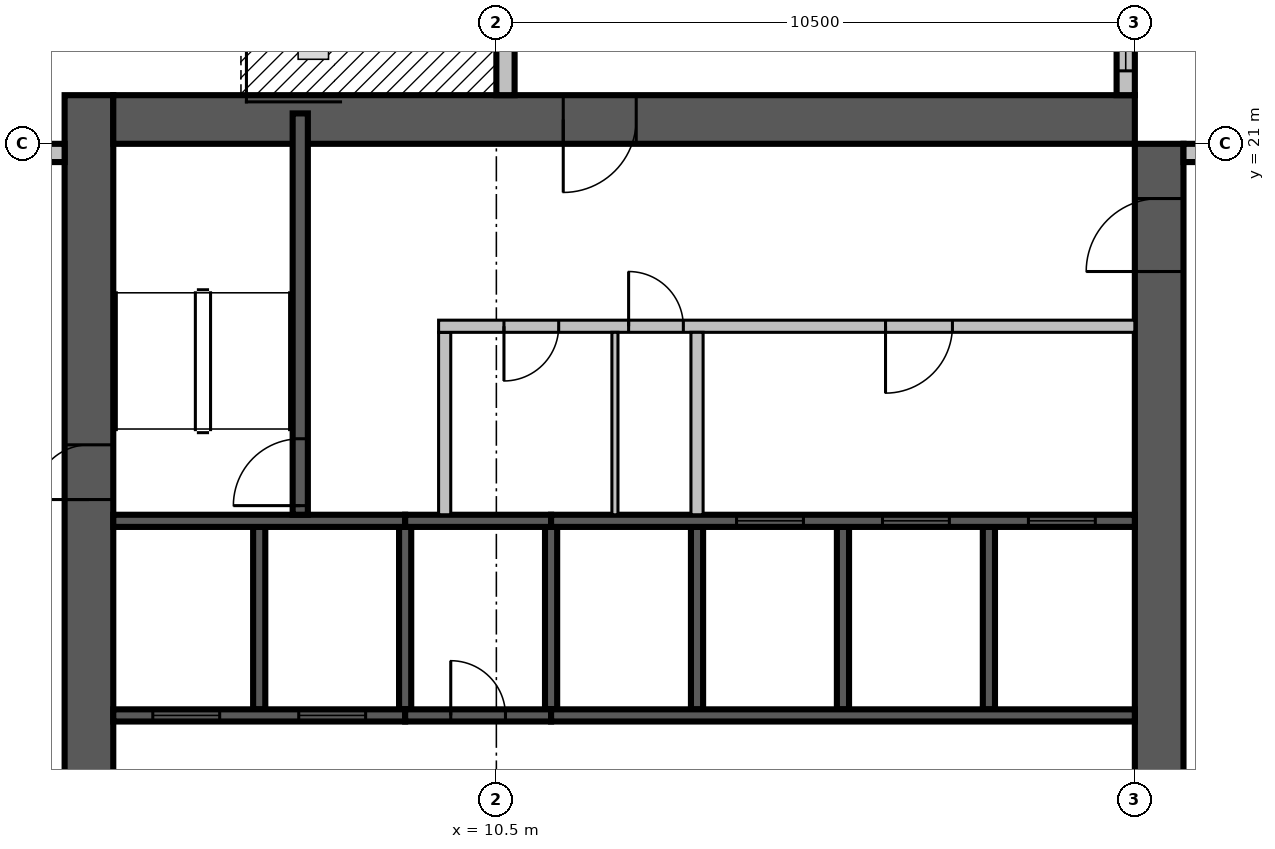
"""IFC4 building model, lengths in metres.
Left out: names, types, materials, properties, quantities, classifications, styles, units other than length and angle.
Written with IfcOpenShell. Run it as: python <this file> out.ifc"""

import sys

from ifc_helpers import new_model, si_unit, direction, frame, frame_2d, origin, place, context, subcontext, project, spatial, rectangle, extrude, source, transform, mapped, element, fill, save


model = new_model("IFC4")
c1 = context("Model", 3, precision=1e-05, world=origin(), true_north=direction((0.0, 1.0)))
c2 = subcontext(c1, "Body", "Model", "MODEL_VIEW")
j1 = project(units=[si_unit("LENGTHUNIT", "METRE"), si_unit("PLANEANGLEUNIT", "RADIAN")], contexts=[c1])
p1 = place(None, origin())
s1 = spatial("IfcSite", under=j1, at=p1, CompositionType="ELEMENT")
p2 = place(p1, origin())
s2 = spatial("IfcBuilding", under=s1, at=p2, CompositionType="ELEMENT")
p3 = place(p2, frame((0.0, 0.0, 231.0)))
s3 = spatial("IfcBuildingStorey", under=s2, at=p3, CompositionType="ELEMENT", Elevation=231.0)
m1 = source(origin(), c2, "Body", "SweptSolid", [
    extrude(rectangle(XDim=17.6, YDim=0.8, at=frame_2d((8.8, 0.0))), origin(), (0.0, 0.0, 1.0), 3.8),
])
p4 = place(p3, frame((3.8, 4.2, 0.0), z_axis=(0.0, 0.0, 1.0), x_axis=(0.0, 1.0, 0.0)))
e1 = element("IfcWall", 1, at=p4, inside=s3, PredefinedType="SHEAR", context=c2, shape_type="MappedRepresentation", body=[
    mapped(m1, transform((0.0, 0.0, 0.0), scale=1.0)),
])
m2 = source(origin(), c2, "Body", "SweptSolid", [
    extrude(rectangle(XDim=2.2, YDim=2.1, at=frame_2d((1.1, 1.05))), frame((0.0, 0.41, 0.0), z_axis=(0.0, -1.0, 0.0), x_axis=(1.0, 0.0, 0.0)), (0.0, 0.0, 1.0), 0.82),
])
p5 = place(p4, frame((4.2, 0.0, 0.0)))
e2 = element("IfcOpeningElement", 2, at=p5, cuts=e1, PredefinedType="OPENING", context=c2, shape_type="MappedRepresentation", body=[
    mapped(m2, transform((0.0, 0.0, 0.0), scale=1.0)),
])
m3 = source(origin(), c2, "Body", "SweptSolid", [
    extrude(rectangle(XDim=0.9, YDim=2.1, at=frame_2d((0.45, 1.05))), frame((0.0, 0.41, 0.0), z_axis=(0.0, -1.0, 0.0), x_axis=(1.0, 0.0, 0.0)), (0.0, 0.0, 1.0), 0.82),
])
p6 = place(p4, frame((10.95, 0.0, 0.0)))
e3 = element("IfcOpeningElement", 3, at=p6, cuts=e1, PredefinedType="OPENING", context=c2, shape_type="MappedRepresentation", body=[
    mapped(m3, transform((0.0, 0.0, 0.0), scale=1.0)),
])
m4 = source(origin(), c2, "Body", "SweptSolid", [
    extrude(rectangle(XDim=16.8, YDim=0.8, at=frame_2d((8.4, 0.0))), origin(), (0.0, 0.0, 1.0), 3.8),
])
p7 = place(p3, frame((21.4, 4.2, 0.0), z_axis=(0.0, 0.0, 1.0), x_axis=(0.0, 1.0, 0.0)))
e4 = element("IfcWall", 4, at=p7, inside=s3, PredefinedType="SHEAR", context=c2, shape_type="MappedRepresentation", body=[
    mapped(m4, transform((0.0, 0.0, 0.0), scale=1.0)),
])
p8 = place(p7, frame((4.2, 0.0, 0.0)))
e5 = element("IfcOpeningElement", 5, at=p8, cuts=e4, PredefinedType="OPENING", context=c2, shape_type="MappedRepresentation", body=[
    mapped(m2, transform((0.0, 0.0, 0.0), scale=1.0)),
])
m5 = source(origin(), c2, "Body", "SweptSolid", [
    extrude(rectangle(XDim=1.2, YDim=2.1, at=frame_2d((0.6, 1.05))), frame((0.0, 0.41, 0.0), z_axis=(0.0, -1.0, 0.0), x_axis=(1.0, 0.0, 0.0)), (0.0, 0.0, 1.0), 0.82),
])
p9 = place(p7, frame((14.7, 0.0, 0.0)))
e6 = element("IfcOpeningElement", 6, at=p9, cuts=e4, PredefinedType="OPENING", context=c2, shape_type="MappedRepresentation", body=[
    mapped(m5, transform((0.0, 0.0, 0.0), scale=1.0)),
])
p10 = place(p3, frame((4.2, 21.4, 0.0), z_axis=(0.0, 0.0, 1.0), x_axis=(1.0, 0.0, 0.0)))
e7 = element("IfcWall", 7, at=p10, inside=s3, PredefinedType="SHEAR", context=c2, shape_type="MappedRepresentation", body=[
    mapped(m4, transform((0.0, 0.0, 0.0), scale=1.0)),
])
p11 = place(p10, frame((7.4, 0.0, 0.0)))
e8 = element("IfcOpeningElement", 8, at=p11, cuts=e7, PredefinedType="OPENING", context=c2, shape_type="MappedRepresentation", body=[
    mapped(m5, transform((0.0, 0.0, 0.0), scale=1.0)),
])
m6 = source(origin(), c2, "Body", "SweptSolid", [
    extrude(rectangle(XDim=7.2, YDim=0.3, at=frame_2d((3.6, 0.0))), origin(), (0.0, 0.0, 1.0), 3.4),
])
p12 = place(p3, frame((29.0, 20.85, 0.0), z_axis=(0.0, 0.0, 1.0), x_axis=(-1.0, 0.0, 0.0)))
e9 = element("IfcWall", 9, at=p12, inside=s3, PredefinedType="STANDARD", context=c2, shape_type="MappedRepresentation", body=[
    mapped(m6, transform((0.0, 0.0, 0.0), scale=1.0)),
])
m7 = source(origin(), c2, "Body", "SweptSolid", [
    extrude(rectangle(XDim=3.0, YDim=2.3, at=frame_2d((1.5, 1.15))), frame((0.0, 0.16, 0.0), z_axis=(0.0, -1.0, 0.0), x_axis=(1.0, 0.0, 0.0)), (0.0, 0.0, 1.0), 0.32),
])
p13 = place(p12, frame((0.2, 0.0, 0.6)))
e10 = element("IfcOpeningElement", 10, at=p13, cuts=e9, PredefinedType="OPENING", context=c2, shape_type="MappedRepresentation", body=[
    mapped(m7, transform((0.0, 0.0, 0.0), scale=1.0)),
])
m8 = source(origin(), c2, "Body", "SweptSolid", [
    extrude(rectangle(XDim=1.8, YDim=2.3, at=frame_2d((0.9, 1.15))), frame((0.0, 0.16, 0.0), z_axis=(0.0, -1.0, 0.0), x_axis=(1.0, 0.0, 0.0)), (0.0, 0.0, 1.0), 0.32),
])
p14 = place(p12, frame((5.0, 0.0, 0.6)))
e11 = element("IfcOpeningElement", 11, at=p14, cuts=e9, PredefinedType="OPENING", context=c2, shape_type="MappedRepresentation", body=[
    mapped(m8, transform((0.0, 0.0, 0.0), scale=1.0)),
])
p15 = place(p3, frame((20.85, 21.8, 0.0), z_axis=(0.0, 0.0, 1.0), x_axis=(0.0, 1.0, 0.0)))
e12 = element("IfcWall", 12, at=p15, inside=s3, PredefinedType="STANDARD", context=c2, shape_type="MappedRepresentation", body=[
    mapped(m6, transform((0.0, 0.0, 0.0), scale=1.0)),
])
p16 = place(p15, frame((0.4, 0.0, 0.6)))
e13 = element("IfcOpeningElement", 13, at=p16, cuts=e12, PredefinedType="OPENING", context=c2, shape_type="MappedRepresentation", body=[
    mapped(m8, transform((0.0, 0.0, 0.0), scale=1.0)),
])
p17 = place(p15, frame((4.0, 0.0, 0.6)))
e14 = element("IfcOpeningElement", 14, at=p17, cuts=e12, PredefinedType="OPENING", context=c2, shape_type="MappedRepresentation", body=[
    mapped(m7, transform((0.0, 0.0, 0.0), scale=1.0)),
])
p18 = place(p3, frame((10.65, 29.0, 0.0), z_axis=(0.0, 0.0, 1.0), x_axis=(0.0, -1.0, 0.0)))
e15 = element("IfcWall", 15, at=p18, inside=s3, PredefinedType="STANDARD", context=c2, shape_type="MappedRepresentation", body=[
    mapped(m6, transform((0.0, 0.0, 0.0), scale=1.0)),
])
m9 = source(origin(), c2, "Body", "SweptSolid", [
    extrude(rectangle(XDim=1.8, YDim=2.4, at=frame_2d((0.9, 1.2))), frame((0.0, 0.16, 0.0), z_axis=(0.0, -1.0, 0.0), x_axis=(1.0, 0.0, 0.0)), (0.0, 0.0, 1.0), 0.32),
])
p19 = place(p18, frame((0.2, 0.0, 0.0)))
e16 = element("IfcOpeningElement", 16, at=p19, cuts=e15, PredefinedType="OPENING", context=c2, shape_type="MappedRepresentation", body=[
    mapped(m9, transform((0.0, 0.0, 0.0), scale=1.0)),
])
p20 = place(p18, frame((4.4, 0.0, 0.0)))
e17 = element("IfcOpeningElement", 17, at=p20, cuts=e15, PredefinedType="OPENING", context=c2, shape_type="MappedRepresentation", body=[
    mapped(m9, transform((0.0, 0.0, 0.0), scale=1.0)),
])
m10 = source(origin(), c2, "Body", "SweptSolid", [
    extrude(rectangle(XDim=2.6, YDim=0.3, at=frame_2d((1.3, 0.0))), origin(), (0.0, 0.0, 1.0), 3.4),
])
p21 = place(p3, frame((3.4, 20.85, 0.0), z_axis=(0.0, 0.0, 1.0), x_axis=(-1.0, 0.0, 0.0)))
e18 = element("IfcWall", 18, at=p21, inside=s3, PredefinedType="STANDARD", context=c2, shape_type="MappedRepresentation", body=[
    mapped(m10, transform((0.0, 0.0, 0.0), scale=1.0)),
])
p22 = place(p21, frame((0.4, 0.0, 0.6)))
e19 = element("IfcOpeningElement", 19, at=p22, cuts=e18, PredefinedType="OPENING", context=c2, shape_type="MappedRepresentation", body=[
    mapped(m8, transform((0.0, 0.0, 0.0), scale=1.0)),
])
m11 = source(origin(), c2, "Body", "SweptSolid", [
    extrude(rectangle(XDim=3.0, YDim=0.2, at=frame_2d((1.5, 0.0))), origin(), (0.0, 0.0, 1.0), 3.8),
])
p23 = place(p3, frame((6.6, 11.7, 0.0), z_axis=(0.0, 0.0, 1.0), x_axis=(0.0, 1.0, 0.0)))
e20 = element("IfcWall", 20, at=p23, inside=s3, PredefinedType="SOLIDWALL", context=c2, shape_type="MappedRepresentation", body=[
    mapped(m11, transform((0.0, 0.0, 0.0), scale=1.0)),
])
m12 = source(origin(), c2, "Body", "SweptSolid", [
    extrude(rectangle(XDim=3.0, YDim=0.2, at=frame_2d((1.5, 0.0))), origin(), (0.0, 0.0, 1.0), 3.4),
])
for number, where, z_axis, x_axis in (
    (21, (9.0, 11.7, 0.0), (0.0, 0.0, 1.0), (0.0, 1.0, 0.0)),
    (22, (11.4, 11.7, 0.0), (0.0, 0.0, 1.0), (0.0, 1.0, 0.0)),
):
    element("IfcWall", number, at=place(p3, frame(where, z_axis=z_axis, x_axis=x_axis)), inside=s3, PredefinedType="SOLIDWALL", context=c2, shape_type="MappedRepresentation", body=[
        mapped(m12, transform((0.0, 0.0, 0.0), scale=1.0)),
    ])
for number, where, z_axis, x_axis in (
    (23, (13.8, 11.7, 0.0), (0.0, 0.0, 1.0), (0.0, 1.0, 0.0)),
    (24, (16.2, 11.7, 0.0), (0.0, 0.0, 1.0), (0.0, 1.0, 0.0)),
    (25, (18.6, 11.7, 0.0), (0.0, 0.0, 1.0), (0.0, 1.0, 0.0)),
):
    element("IfcWall", number, at=place(p3, frame(where, z_axis=z_axis, x_axis=x_axis)), inside=s3, PredefinedType="SOLIDWALL", context=c2, shape_type="MappedRepresentation", body=[
        mapped(m11, transform((0.0, 0.0, 0.0), scale=1.0)),
    ])
m13 = source(origin(), c2, "Body", "SweptSolid", [
    extrude(rectangle(XDim=4.8, YDim=0.2, at=frame_2d((2.4, 0.0))), origin(), (0.0, 0.0, 1.0), 3.8),
])
p24 = place(p3, frame((4.2, 11.6, 0.0), z_axis=(0.0, 0.0, 1.0), x_axis=(1.0, 0.0, 0.0)))
e26 = element("IfcWall", 26, at=p24, inside=s3, PredefinedType="SOLIDWALL", context=c2, shape_type="MappedRepresentation", body=[
    mapped(m13, transform((0.0, 0.0, 0.0), scale=1.0)),
])
m14 = source(origin(), c2, "Body", "SweptSolid", [
    extrude(rectangle(XDim=1.1, YDim=2.1, at=frame_2d((0.55, 1.05))), frame((0.0, 0.11, 0.0), z_axis=(0.0, -1.0, 0.0), x_axis=(1.0, 0.0, 0.0)), (0.0, 0.0, 1.0), 0.22),
])
p25 = place(p24, frame((0.65, 0.0, 0.0)))
e27 = element("IfcOpeningElement", 27, at=p25, cuts=e26, PredefinedType="OPENING", context=c2, shape_type="MappedRepresentation", body=[
    mapped(m14, transform((0.0, 0.0, 0.0), scale=1.0)),
])
p26 = place(p24, frame((3.05, 0.0, 0.0)))
e28 = element("IfcOpeningElement", 28, at=p26, cuts=e26, PredefinedType="OPENING", context=c2, shape_type="MappedRepresentation", body=[
    mapped(m14, transform((0.0, 0.0, 0.0), scale=1.0)),
])
m15 = source(origin(), c2, "Body", "SweptSolid", [
    extrude(rectangle(XDim=2.4, YDim=0.2, at=frame_2d((1.2, 0.0))), origin(), (0.0, 0.0, 1.0), 3.4),
])
p27 = place(p3, frame((9.0, 11.6, 0.0), z_axis=(0.0, 0.0, 1.0), x_axis=(1.0, 0.0, 0.0)))
e29 = element("IfcWall", 29, at=p27, inside=s3, PredefinedType="SOLIDWALL", context=c2, shape_type="MappedRepresentation", body=[
    mapped(m15, transform((0.0, 0.0, 0.0), scale=1.0)),
])
m16 = source(origin(), c2, "Body", "SweptSolid", [
    extrude(rectangle(XDim=0.9, YDim=2.1, at=frame_2d((0.45, 1.05))), frame((0.0, 0.11, 0.0), z_axis=(0.0, -1.0, 0.0), x_axis=(1.0, 0.0, 0.0)), (0.0, 0.0, 1.0), 0.22),
])
p28 = place(p27, frame((0.75, 0.0, 0.0)))
e30 = element("IfcOpeningElement", 30, at=p28, cuts=e29, PredefinedType="OPENING", context=c2, shape_type="MappedRepresentation", body=[
    mapped(m16, transform((0.0, 0.0, 0.0), scale=1.0)),
])
m17 = source(origin(), c2, "Body", "SweptSolid", [
    extrude(rectangle(XDim=9.6, YDim=0.2, at=frame_2d((4.8, 0.0))), origin(), (0.0, 0.0, 1.0), 3.8),
])
p29 = place(p3, frame((11.4, 11.6, 0.0), z_axis=(0.0, 0.0, 1.0), x_axis=(1.0, 0.0, 0.0)))
e31 = element("IfcWall", 31, at=p29, inside=s3, PredefinedType="SOLIDWALL", context=c2, shape_type="MappedRepresentation", body=[
    mapped(m17, transform((0.0, 0.0, 0.0), scale=1.0)),
])
p30 = place(p3, frame((4.2, 14.8, 0.0), z_axis=(0.0, 0.0, 1.0), x_axis=(1.0, 0.0, 0.0)))
e32 = element("IfcWall", 32, at=p30, inside=s3, PredefinedType="SOLIDWALL", context=c2, shape_type="MappedRepresentation", body=[
    mapped(m13, transform((0.0, 0.0, 0.0), scale=1.0)),
])
p31 = place(p3, frame((9.0, 14.8, 0.0), z_axis=(0.0, 0.0, 1.0), x_axis=(1.0, 0.0, 0.0)))
e33 = element("IfcWall", 33, at=p31, inside=s3, PredefinedType="SOLIDWALL", context=c2, shape_type="MappedRepresentation", body=[
    mapped(m15, transform((0.0, 0.0, 0.0), scale=1.0)),
])
p32 = place(p3, frame((11.4, 14.8, 0.0), z_axis=(0.0, 0.0, 1.0), x_axis=(1.0, 0.0, 0.0)))
e34 = element("IfcWall", 34, at=p32, inside=s3, PredefinedType="SOLIDWALL", context=c2, shape_type="MappedRepresentation", body=[
    mapped(m17, transform((0.0, 0.0, 0.0), scale=1.0)),
])
p33 = place(p32, frame((3.05, 0.0, 0.0)))
e35 = element("IfcOpeningElement", 35, at=p33, cuts=e34, PredefinedType="OPENING", context=c2, shape_type="MappedRepresentation", body=[
    mapped(m14, transform((0.0, 0.0, 0.0), scale=1.0)),
])
p34 = place(p32, frame((5.45, 0.0, 0.0)))
e36 = element("IfcOpeningElement", 36, at=p34, cuts=e34, PredefinedType="OPENING", context=c2, shape_type="MappedRepresentation", body=[
    mapped(m14, transform((0.0, 0.0, 0.0), scale=1.0)),
])
p35 = place(p32, frame((7.85, 0.0, 0.0)))
e37 = element("IfcOpeningElement", 37, at=p35, cuts=e34, PredefinedType="OPENING", context=c2, shape_type="MappedRepresentation", body=[
    mapped(m14, transform((0.0, 0.0, 0.0), scale=1.0)),
])
m18 = source(origin(), c2, "Body", "SweptSolid", [
    extrude(rectangle(XDim=6.6, YDim=0.25, at=frame_2d((3.3, 0.0))), origin(), (0.0, 0.0, 1.0), 3.4),
])
p36 = place(p3, frame((7.275, 14.9, 0.0), z_axis=(0.0, 0.0, 1.0), x_axis=(0.0, 1.0, 0.0)))
e38 = element("IfcWall", 38, at=p36, inside=s3, PredefinedType="SOLIDWALL", context=c2, shape_type="MappedRepresentation", body=[
    mapped(m18, transform((0.0, 0.0, 0.0), scale=1.0)),
])
m19 = source(origin(), c2, "Body", "SweptSolid", [
    extrude(rectangle(XDim=1.1, YDim=2.1, at=frame_2d((0.55, 1.05))), frame((0.0, 0.135, 0.0), z_axis=(0.0, -1.0, 0.0), x_axis=(1.0, 0.0, 0.0)), (0.0, 0.0, 1.0), 0.27),
])
p37 = place(p36, frame((0.15, 0.0, 0.0)))
e39 = element("IfcOpeningElement", 39, at=p37, cuts=e38, PredefinedType="OPENING", context=c2, shape_type="MappedRepresentation", body=[
    mapped(m19, transform((0.0, 0.0, 0.0), scale=1.0)),
])
m20 = source(origin(), c2, "Body", "SweptSolid", [
    extrude(rectangle(XDim=3.0, YDim=0.2, at=frame_2d((1.5, 0.0))), origin(), (0.0, 0.0, 1.0), 3.4),
])
p38 = place(p3, frame((9.65, 14.9, 0.0), z_axis=(0.0, 0.0, 1.0), x_axis=(0.0, 1.0, 0.0)))
e40 = element("IfcWall", 40, at=p38, inside=s3, PredefinedType="PARTITIONING", context=c2, shape_type="MappedRepresentation", body=[
    mapped(m20, transform((0.0, 0.0, 0.0), scale=1.0)),
])
m21 = source(origin(), c2, "Body", "SweptSolid", [
    extrude(rectangle(XDim=11.45, YDim=0.2, at=frame_2d((5.725, 0.0))), origin(), (0.0, 0.0, 1.0), 3.4),
])
p39 = place(p3, frame((9.55, 18.0, 0.0), z_axis=(0.0, 0.0, 1.0), x_axis=(1.0, 0.0, 0.0)))
e41 = element("IfcWall", 41, at=p39, inside=s3, PredefinedType="PARTITIONING", context=c2, shape_type="MappedRepresentation", body=[
    mapped(m21, transform((0.0, 0.0, 0.0), scale=1.0)),
])
p40 = place(p39, frame((1.075, 0.0, 0.0)))
e42 = element("IfcOpeningElement", 42, at=p40, cuts=e41, PredefinedType="OPENING", context=c2, shape_type="MappedRepresentation", body=[
    mapped(m16, transform((0.0, 0.0, 0.0), scale=1.0)),
])
p41 = place(p39, frame((3.125, 0.0, 0.0)))
e43 = element("IfcOpeningElement", 43, at=p41, cuts=e41, PredefinedType="OPENING", context=c2, shape_type="MappedRepresentation", body=[
    mapped(m16, transform((0.0, 0.0, 0.0), scale=1.0)),
])
p42 = place(p39, frame((7.35, 0.0, 0.0)))
e44 = element("IfcOpeningElement", 44, at=p42, cuts=e41, PredefinedType="OPENING", context=c2, shape_type="MappedRepresentation", body=[
    mapped(m14, transform((0.0, 0.0, 0.0), scale=1.0)),
])
p43 = place(p3, frame((13.8, 14.9, 0.0), z_axis=(0.0, 0.0, 1.0), x_axis=(0.0, 1.0, 0.0)))
e45 = element("IfcWall", 45, at=p43, inside=s3, PredefinedType="PARTITIONING", context=c2, shape_type="MappedRepresentation", body=[
    mapped(m20, transform((0.0, 0.0, 0.0), scale=1.0)),
])
m22 = source(origin(), c2, "Body", "SweptSolid", [
    extrude(rectangle(XDim=3.0, YDim=0.1, at=frame_2d((1.5, 0.0))), origin(), (0.0, 0.0, 1.0), 3.4),
])
p44 = place(p3, frame((12.45, 14.9, 0.0), z_axis=(0.0, 0.0, 1.0), x_axis=(0.0, 1.0, 0.0)))
e46 = element("IfcWall", 46, at=p44, inside=s3, PredefinedType="PARTITIONING", context=c2, shape_type="MappedRepresentation", body=[
    mapped(m22, transform((0.0, 0.0, 0.0), scale=1.0)),
])
m23 = source(origin(), c2, "Body", "SweptSolid", [
    extrude(rectangle(XDim=1.8, YDim=2.3, at=frame_2d((0.9, 1.15))), frame((0.0, 0.03, 0.0), z_axis=(0.0, -1.0, 0.0), x_axis=(1.0, 0.0, 0.0)), (0.0, 0.0, 1.0), 0.06),
])
p45 = place(p16, origin())
e47 = element("IfcWindow", 47, at=p45, inside=s3, PartitioningType="SINGLE_PANEL", PredefinedType="WINDOW", context=c2, shape_type="MappedRepresentation", body=[
    mapped(m23, transform((0.0, 0.0, 0.0), scale=1.0)),
])
fill(e13, e47)
m24 = source(origin(), c2, "Body", "SweptSolid", [
    extrude(rectangle(XDim=1.1, YDim=2.1, at=frame_2d((0.55, 1.05))), frame((0.0, 0.025, 0.0), z_axis=(0.0, -1.0, 0.0), x_axis=(1.0, 0.0, 0.0)), (0.0, 0.0, 1.0), 0.05),
])
p46 = place(p25, origin())
e48 = element("IfcDoor", 48, at=p46, inside=s3, OperationType="SLIDING_TO_LEFT", PredefinedType="DOOR", context=c2, shape_type="MappedRepresentation", body=[
    mapped(m24, transform((0.0, 0.0, 0.0), scale=1.0)),
])
fill(e27, e48)
p47 = place(p26, origin())
e49 = element("IfcDoor", 49, at=p47, inside=s3, OperationType="SLIDING_TO_LEFT", PredefinedType="DOOR", context=c2, shape_type="MappedRepresentation", body=[
    mapped(m24, transform((0.0, 0.0, 0.0), scale=1.0)),
])
fill(e28, e49)
m25 = source(origin(), c2, "Body", "SweptSolid", [
    extrude(rectangle(XDim=0.9, YDim=2.1, at=frame_2d((0.45, 1.05))), frame((0.0, 0.025, 0.0), z_axis=(0.0, -1.0, 0.0), x_axis=(1.0, 0.0, 0.0)), (0.0, 0.0, 1.0), 0.05),
])
p48 = place(p28, origin())
e50 = element("IfcDoor", 50, at=p48, inside=s3, OperationType="SINGLE_SWING_LEFT", PredefinedType="DOOR", context=c2, shape_type="MappedRepresentation", body=[
    mapped(m25, transform((0.0, 0.0, 0.0), scale=1.0)),
])
fill(e30, e50)
p49 = place(p33, origin())
e51 = element("IfcDoor", 51, at=p49, inside=s3, OperationType="SLIDING_TO_LEFT", PredefinedType="DOOR", context=c2, shape_type="MappedRepresentation", body=[
    mapped(m24, transform((0.0, 0.0, 0.0), scale=1.0)),
])
fill(e35, e51)
p50 = place(p34, origin())
e52 = element("IfcDoor", 52, at=p50, inside=s3, OperationType="SLIDING_TO_LEFT", PredefinedType="DOOR", context=c2, shape_type="MappedRepresentation", body=[
    mapped(m24, transform((0.0, 0.0, 0.0), scale=1.0)),
])
fill(e36, e52)
p51 = place(p35, origin())
e53 = element("IfcDoor", 53, at=p51, inside=s3, OperationType="SLIDING_TO_LEFT", PredefinedType="DOOR", context=c2, shape_type="MappedRepresentation", body=[
    mapped(m24, transform((0.0, 0.0, 0.0), scale=1.0)),
])
fill(e37, e53)
p52 = place(p37, origin())
e54 = element("IfcDoor", 54, at=p52, inside=s3, OperationType="SINGLE_SWING_LEFT", PredefinedType="DOOR", context=c2, shape_type="MappedRepresentation", body=[
    mapped(m24, transform((0.0, 0.0, 0.0), scale=1.0)),
])
fill(e39, e54)
p53 = place(p40, origin())
e55 = element("IfcDoor", 55, at=p53, inside=s3, OperationType="SINGLE_SWING_RIGHT", PredefinedType="DOOR", context=c2, shape_type="MappedRepresentation", body=[
    mapped(m25, transform((0.0, 0.0, 0.0), scale=1.0)),
])
fill(e42, e55)
p54 = place(p41, origin())
e56 = element("IfcDoor", 56, at=p54, inside=s3, OperationType="SINGLE_SWING_LEFT", PredefinedType="DOOR", context=c2, shape_type="MappedRepresentation", body=[
    mapped(m25, transform((0.0, 0.0, 0.0), scale=1.0)),
])
fill(e43, e56)
p55 = place(p42, origin())
e57 = element("IfcDoor", 57, at=p55, inside=s3, OperationType="SINGLE_SWING_RIGHT", PredefinedType="DOOR", context=c2, shape_type="MappedRepresentation", body=[
    mapped(m24, transform((0.0, 0.0, 0.0), scale=1.0)),
])
fill(e44, e57)
m26 = source(origin(), c2, "Body", "SweptSolid", [
    extrude(rectangle(XDim=1.2, YDim=2.1, at=frame_2d((0.6, 1.05))), frame((0.0, 0.025, 0.0), z_axis=(0.0, -1.0, 0.0), x_axis=(1.0, 0.0, 0.0)), (0.0, 0.0, 1.0), 0.05),
])
p56 = place(p11, origin())
e58 = element("IfcDoor", 58, at=p56, inside=s3, OperationType="SINGLE_SWING_RIGHT", PredefinedType="DOOR", context=c2, shape_type="MappedRepresentation", body=[
    mapped(m26, transform((0.0, 0.0, 0.0), scale=1.0)),
])
fill(e8, e58)
p57 = place(p9, origin())
e59 = element("IfcDoor", 59, at=p57, inside=s3, OperationType="SINGLE_SWING_LEFT", PredefinedType="DOOR", context=c2, shape_type="MappedRepresentation", body=[
    mapped(m26, transform((0.0, 0.0, 0.0), scale=1.0)),
])
fill(e6, e59)
p58 = place(p6, origin())
e60 = element("IfcDoor", 60, at=p58, inside=s3, OperationType="SINGLE_SWING_LEFT", PredefinedType="DOOR", context=c2, shape_type="MappedRepresentation", body=[
    mapped(m25, transform((0.0, 0.0, 0.0), scale=1.0)),
])
fill(e3, e60)
save(model, sys.argv[1])
